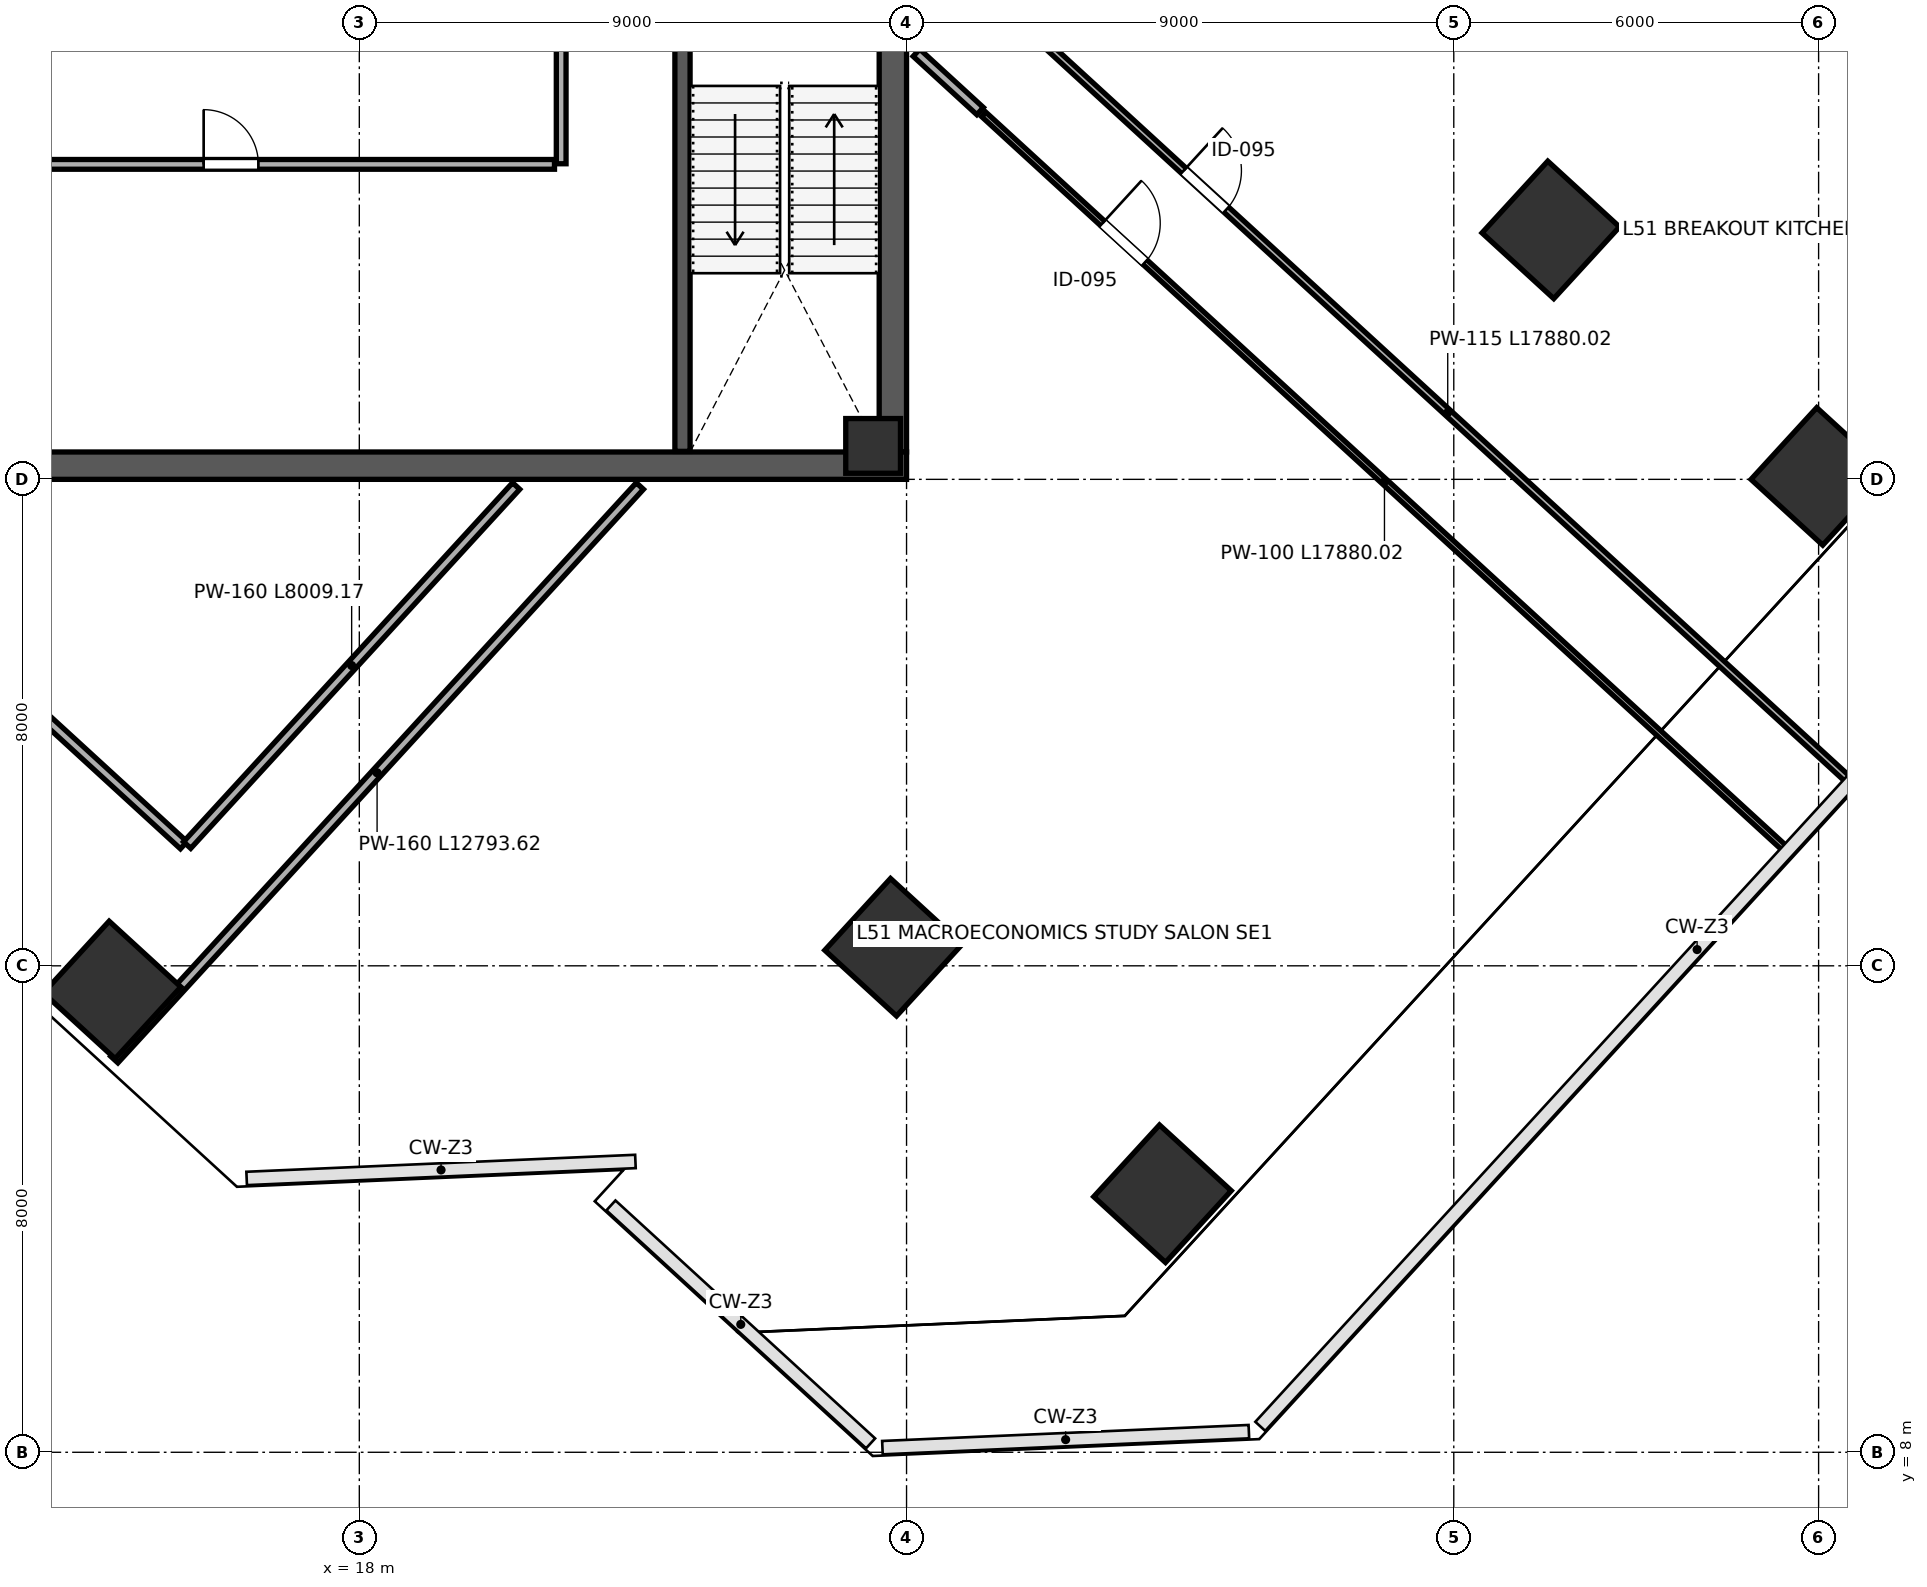
"""IFC4 building model, lengths in metres.
Left out: names, types, materials, properties, quantities, classifications, styles, units other than length and angle.
Written with IfcOpenShell. Run it as: python <this file> out.ifc"""

import sys

from ifc_helpers import new_model, si_unit, direction, frame, frame_2d, origin, origin_2d, place, context, subcontext, project, spatial, rectangle, extrude, source, transform, mapped, element, fill, save


model = new_model("IFC4")
c1 = context("Model", 3, precision=1e-05, world=origin(), true_north=direction((0.0, 1.0)))
c2 = subcontext(c1, "Body", "Model", "MODEL_VIEW")
j1 = project(units=[si_unit("LENGTHUNIT", "METRE"), si_unit("PLANEANGLEUNIT", "RADIAN")], contexts=[c1])
p1 = place(None, origin())
s1 = spatial("IfcSite", under=j1, at=p1, CompositionType="ELEMENT")
p2 = place(p1, origin())
s2 = spatial("IfcBuilding", under=s1, at=p2, CompositionType="ELEMENT")
p3 = place(p2, frame((0.0, 0.0, 229.0)))
s3 = spatial("IfcBuildingStorey", under=s2, at=p3, CompositionType="ELEMENT", Elevation=229.0)
m1 = source(origin(), c2, "Body", "SweptSolid", [
    extrude(rectangle(XDim=0.9, YDim=0.9, at=origin_2d()), origin(), (0.0, 0.0, 1.0), 4.198),
])
p4 = place(p3, frame((26.45, 24.55, 0.001), z_axis=(0.0, 0.0, 1.0), x_axis=(1.0, 0.0, 0.0)))
e1 = element("IfcColumn", 1, at=p4, inside=s3, PredefinedType="COLUMN", context=c2, shape_type="MappedRepresentation", body=[
    mapped(m1, transform((0.0, 0.0, 0.0), scale=1.0)),
])
m2 = source(origin(), c2, "Body", "SweptSolid", [
    extrude(rectangle(XDim=1.6, YDim=1.6, at=origin_2d()), origin(), (0.0, 0.0, 1.0), 4.198),
])
p5 = place(p3, frame((13.935, 15.603, 0.001), z_axis=(0.0, 0.0, 1.0), x_axis=(-0.73727733681, 0.675590207616, 0.0)))
e2 = element("IfcColumn", 2, at=p5, inside=s3, PredefinedType="COLUMN", context=c2, shape_type="MappedRepresentation", body=[
    mapped(m2, transform((0.0, 0.0, 0.0), scale=1.0)),
])
m3 = source(origin(), c2, "Body", "SweptSolid", [
    extrude(rectangle(XDim=1.6, YDim=1.6, at=origin_2d()), origin(), (0.0, 0.0, 1.0), 4.198),
])
for number, where, z_axis, x_axis in (
    (3, (26.786, 16.306, 0.001), (0.0, 0.0, 1.0), (-0.737, 0.676, 0.0)),
    (4, (37.595, 28.102, 0.001), (0.0, 0.0, 1.0), (-0.737, 0.676, 0.0)),
):
    element("IfcColumn", number, at=place(p3, frame(where, z_axis=z_axis, x_axis=x_axis)), inside=s3, PredefinedType="COLUMN", context=c2, shape_type="MappedRepresentation", body=[
        mapped(m3, transform((0.0, 0.0, 0.0), scale=1.0)),
    ])
for number, where, z_axis, x_axis in (
    (5, (31.209, 12.252, 0.001), (0.0, 0.0, 1.0), (-0.737, 0.676, 0.0)),
    (6, (42.019, 24.049, 0.001), (0.0, 0.0, 1.0), (-0.737, 0.676, 0.0)),
):
    element("IfcColumn", number, at=place(p3, frame(where, z_axis=z_axis, x_axis=x_axis)), inside=s3, PredefinedType="COLUMN", context=c2, shape_type="MappedRepresentation", body=[
        mapped(m2, transform((0.0, 0.0, 0.0), scale=1.0)),
    ])
p6 = place(p3, frame((26.775, 24.45, 0.0), z_axis=(0.0, 0.0, 1.0), x_axis=(0.0, 1.0, 0.0)))
e7 = element("IfcWall", 7, at=p6, inside=s3, PredefinedType="SHEAR", context=c2, shape_type="SweptSolid", body=[
    extrude(rectangle(XDim=15.1, YDim=0.45, at=frame_2d((7.55, 0.0))), origin(), (0.0, 0.0, 1.0), 3.96),
])
p7 = place(p6, frame((8.6, 0.0, 0.0)))
e8 = element("IfcOpeningElement", 8, at=p7, cuts=e7, PredefinedType="OPENING", context=c2, shape_type="SweptSolid", body=[
    extrude(rectangle(XDim=1.15, YDim=2.2, at=frame_2d((0.575, 1.1))), frame((0.0, 0.235, 0.0), z_axis=(0.0, -1.0, 0.0), x_axis=(1.0, 0.0, 0.0)), (0.0, 0.0, 1.0), 0.47),
])
p8 = place(p3, frame((9.0, 24.225, 0.0), z_axis=(0.0, 0.0, 1.0), x_axis=(1.0, 0.0, 0.0)))
e9 = element("IfcWall", 9, at=p8, inside=s3, PredefinedType="SHEAR", context=c2, shape_type="SweptSolid", body=[
    extrude(rectangle(XDim=18.0, YDim=0.45, at=frame_2d((9.0, 0.0))), origin(), (0.0, 0.0, 1.0), 3.96),
])
p9 = place(p3, frame((23.315, 24.46, 0.0), z_axis=(0.0, 0.0, 1.0), x_axis=(0.0, 1.0, 0.0)))
e10 = element("IfcWall", 10, at=p9, inside=s3, PredefinedType="SHEAR", context=c2, shape_type="SweptSolid", body=[
    extrude(rectangle(XDim=7.49, YDim=0.25, at=frame_2d((3.745, 0.0))), origin(), (0.0, 0.0, 1.0), 3.96),
])
p10 = place(p3, frame((12.84, 29.18, 0.0), z_axis=(0.0, 0.0, 1.0), x_axis=(1.0, 0.0, 0.0)))
e11 = element("IfcWall", 11, at=p10, inside=s3, PredefinedType="PARTITIONING", context=c2, shape_type="SweptSolid", body=[
    extrude(rectangle(XDim=8.37, YDim=0.16, at=frame_2d((4.185, 0.0))), origin(), (0.0, 0.0, 1.0), 3.96),
])
p11 = place(p10, frame((2.6, 0.0, 0.0)))
e12 = element("IfcOpeningElement", 12, at=p11, cuts=e11, PredefinedType="OPENING", context=c2, shape_type="SweptSolid", body=[
    extrude(rectangle(XDim=0.9, YDim=2.15, at=frame_2d((0.45, 1.075))), frame((0.0, 0.09, 0.0), z_axis=(0.0, -1.0, 0.0), x_axis=(1.0, 0.0, 0.0)), (0.0, 0.0, 1.0), 0.18),
])
p12 = place(p3, frame((21.32, 29.19, 0.0), z_axis=(0.0, 0.0, 1.0), x_axis=(0.0, 1.0, 0.0)))
e13 = element("IfcWall", 13, at=p12, inside=s3, PredefinedType="PARTITIONING", context=c2, shape_type="SweptSolid", body=[
    extrude(rectangle(XDim=2.92, YDim=0.16, at=frame_2d((1.46, 0.0))), origin(), (0.0, 0.0, 1.0), 3.96),
])
p13 = place(p3, frame((4.739, 27.489, 0.0), z_axis=(0.0, 0.0, 1.0), x_axis=(0.737276572642, -0.675591041558, 0.0)))
e14 = element("IfcWall", 14, at=p13, inside=s3, PredefinedType="PARTITIONING", context=c2, shape_type="SweptSolid", body=[
    extrude(rectangle(XDim=14.07, YDim=0.16, at=frame_2d((7.035, 0.0))), origin(), (0.0, 0.0, 1.0), 3.96),
])
p14 = place(p13, frame((1.15, 0.0, 0.0)))
e15 = element("IfcOpeningElement", 15, at=p14, cuts=e14, PredefinedType="OPENING", context=c2, shape_type="SweptSolid", body=[
    extrude(rectangle(XDim=0.95, YDim=2.15, at=frame_2d((0.475, 1.075))), frame((0.0, 0.09, 0.0), z_axis=(0.0, -1.0, 0.0), x_axis=(1.0, 0.0, 0.0)), (0.0, 0.0, 1.0), 0.18),
])
p15 = place(p3, frame((15.168, 17.986, 0.0), z_axis=(0.0, 0.0, 1.0), x_axis=(0.675616954369, 0.737252827034, 0.0)))
e16 = element("IfcWall", 16, at=p15, inside=s3, PredefinedType="PARTITIONING", context=c2, shape_type="SweptSolid", body=[
    extrude(rectangle(XDim=8.009, YDim=0.16, at=frame_2d((4.005, 0.0))), origin(), (0.0, 0.0, 1.0), 3.96),
])
p16 = place(p3, frame((27.163, 31.016, 0.0), z_axis=(0.0, 0.0, 1.0), x_axis=(0.737296869908, -0.675568890361, 0.0)))
e17 = element("IfcWall", 17, at=p16, inside=s3, PredefinedType="PARTITIONING", context=c2, shape_type="SweptSolid", body=[
    extrude(rectangle(XDim=1.42, YDim=0.16, at=frame_2d((0.71, 0.0))), origin(), (0.0, 0.0, 1.0), 3.96),
])
p17 = place(p3, frame((13.971, 14.458, 0.0), z_axis=(0.0, 0.0, 1.0), x_axis=(0.675595861889, 0.737272155583, 0.0)))
e18 = element("IfcWall", 18, at=p17, inside=s3, PredefinedType="PARTITIONING", context=c2, shape_type="SweptSolid", body=[
    extrude(rectangle(XDim=12.794, YDim=0.16, at=frame_2d((6.397, 0.0))), origin(), (0.0, 0.0, 1.0), 3.96),
])
p18 = place(p3, frame((29.309, 31.138, 0.0), z_axis=(0.0, 0.0, 1.0), x_axis=(0.737278819957, -0.675588589041, 0.0)))
e19 = element("IfcWall", 19, at=p18, inside=s3, PredefinedType="PARTITIONING", context=c2, shape_type="SweptSolid", body=[
    extrude(rectangle(XDim=17.88, YDim=0.115, at=frame_2d((8.94, 0.0))), origin(), (0.0, 0.0, 1.0), 3.252),
])
p19 = place(p18, frame((3.05, 0.0, 0.0)))
e20 = element("IfcOpeningElement", 20, at=p19, cuts=e19, PredefinedType="OPENING", context=c2, shape_type="SweptSolid", body=[
    extrude(rectangle(XDim=0.95, YDim=2.15, at=frame_2d((0.475, 1.075))), frame((0.0, 0.067, 0.0), z_axis=(0.0, -1.0, 0.0), x_axis=(1.0, 0.0, 0.0)), (0.0, 0.0, 1.0), 0.135),
])
p20 = place(p3, frame((28.269, 30.002, 0.0), z_axis=(0.0, 0.0, 1.0), x_axis=(0.737272587758, -0.67559539026, 0.0)))
e21 = element("IfcWall", 21, at=p20, inside=s3, PredefinedType="PARTITIONING", context=c2, shape_type="SweptSolid", body=[
    extrude(rectangle(XDim=17.88, YDim=0.1, at=frame_2d((8.94, 0.0))), origin(), (0.0, 0.0, 1.0), 3.252),
])
p21 = place(p20, frame((2.65, 0.0, 0.0)))
e22 = element("IfcOpeningElement", 22, at=p21, cuts=e21, PredefinedType="OPENING", context=c2, shape_type="SweptSolid", body=[
    extrude(rectangle(XDim=0.95, YDim=2.15, at=frame_2d((0.475, 1.075))), frame((0.0, 0.06, 0.0), z_axis=(0.0, -1.0, 0.0), x_axis=(1.0, 0.0, 0.0)), (0.0, 0.0, 1.0), 0.12),
])
m4 = source(origin(), c2, "Body", "SweptSolid", [
    extrude(rectangle(XDim=0.9, YDim=2.15, at=frame_2d((0.45, 1.075))), frame((0.0, 0.025, 0.0), z_axis=(0.0, -1.0, 0.0), x_axis=(1.0, 0.0, 0.0)), (0.0, 0.0, 1.0), 0.05),
])
p22 = place(p11, origin())
e23 = element("IfcDoor", 23, at=p22, inside=s3, OperationType="SINGLE_SWING_LEFT", PredefinedType="DOOR", context=c2, shape_type="MappedRepresentation", body=[
    mapped(m4, transform((0.0, 0.0, 0.0), scale=1.0)),
])
fill(e12, e23)
m5 = source(origin(), c2, "Body", "SweptSolid", [
    extrude(rectangle(XDim=0.95, YDim=2.15, at=frame_2d((0.475, 1.075))), frame((0.0, 0.025, 0.0), z_axis=(0.0, -1.0, 0.0), x_axis=(1.0, 0.0, 0.0)), (0.0, 0.0, 1.0), 0.05),
])
p23 = place(p19, origin())
e24 = element("IfcDoor", 24, at=p23, inside=s3, OperationType="SINGLE_SWING_LEFT", PredefinedType="DOOR", context=c2, shape_type="MappedRepresentation", body=[
    mapped(m5, transform((0.0, 0.0, 0.0), scale=1.0)),
])
fill(e20, e24)
p24 = place(p21, origin())
e25 = element("IfcDoor", 25, at=p24, inside=s3, OperationType="SINGLE_SWING_LEFT", PredefinedType="DOOR", context=c2, shape_type="MappedRepresentation", body=[
    mapped(m5, transform((0.0, 0.0, 0.0), scale=1.0)),
])
fill(e22, e25)
save(model, sys.argv[1])
